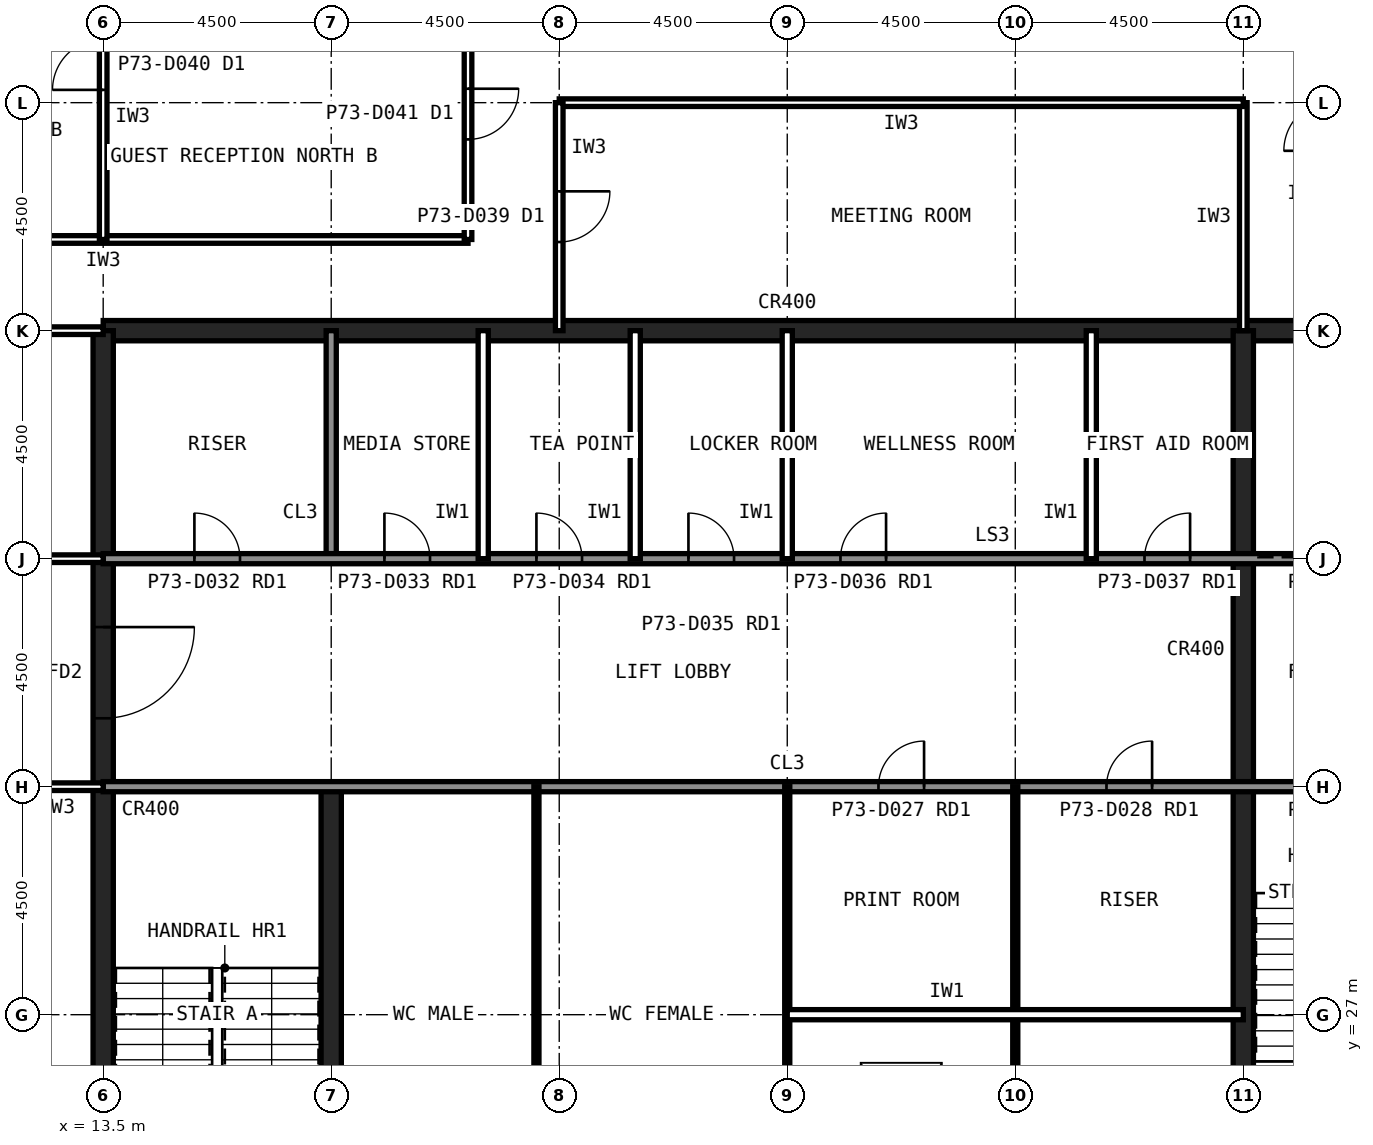
"""IFC4 building model, lengths in metres.
Left out: names, types, materials, properties, quantities, classifications, styles, units other than length and angle.
Written with IfcOpenShell. Run it as: python <this file> out.ifc"""

import sys

from ifc_helpers import new_model, si_unit, direction, frame, frame_2d, origin, place, context, subcontext, project, spatial, rectangle, extrude, element, fill, save


model = new_model("IFC4")
c1 = context("Model", 3, precision=1e-05, world=origin(), true_north=direction((0.0, 1.0)))
c2 = subcontext(c1, "Body", "Model", "MODEL_VIEW")
j1 = project(units=[si_unit("LENGTHUNIT", "METRE"), si_unit("PLANEANGLEUNIT", "RADIAN")], contexts=[c1])
p1 = place(None, origin())
s1 = spatial("IfcSite", under=j1, at=p1, CompositionType="ELEMENT")
p2 = place(p1, origin())
s2 = spatial("IfcBuilding", under=s1, at=p2, CompositionType="ELEMENT")
p3 = place(p2, frame((0.0, 0.0, 302.6)))
s3 = spatial("IfcBuildingStorey", under=s2, at=p3, CompositionType="ELEMENT", Elevation=302.6)
p4 = place(p3, frame((40.5, 40.5, 0.0), z_axis=(0.0, 0.0, 1.0), x_axis=(-1.0, 0.0, 0.0)))
e1 = element("IfcWall", 1, at=p4, inside=s3, PredefinedType="SHEAR", context=c2, shape_type="SweptSolid", body=[
    extrude(rectangle(XDim=27.0, YDim=0.4, at=frame_2d((13.5, 0.0))), origin(), (0.0, 0.0, 1.0), 4.0),
])
p5 = place(p3, frame((13.5, 40.5, 0.0), z_axis=(0.0, 0.0, 1.0), x_axis=(0.0, -1.0, 0.0)))
e2 = element("IfcWall", 2, at=p5, inside=s3, PredefinedType="SHEAR", context=c2, shape_type="SweptSolid", body=[
    extrude(rectangle(XDim=27.0, YDim=0.4, at=frame_2d((13.5, 0.0))), origin(), (0.0, 0.0, 1.0), 4.0),
])
p6 = place(p5, frame((19.65, 0.0, 0.0)))
e3 = element("IfcOpeningElement", 3, at=p6, cuts=e2, PredefinedType="OPENING", context=c2, shape_type="SweptSolid", body=[
    extrude(rectangle(XDim=1.2, YDim=2.1, at=frame_2d((0.6, 1.05))), frame((0.0, 0.21, 0.0), z_axis=(0.0, -1.0, 0.0), x_axis=(1.0, 0.0, 0.0)), (0.0, 0.0, 1.0), 0.42),
])
p7 = place(p5, frame((5.85, 0.0, 0.0)))
e4 = element("IfcOpeningElement", 4, at=p7, cuts=e2, PredefinedType="OPENING", context=c2, shape_type="SweptSolid", body=[
    extrude(rectangle(XDim=1.8, YDim=2.1, at=frame_2d((0.9, 1.05))), frame((0.0, 0.21, 0.0), z_axis=(0.0, -1.0, 0.0), x_axis=(1.0, 0.0, 0.0)), (0.0, 0.0, 1.0), 0.42),
])
p8 = place(p3, frame((18.0, 13.5, 0.0), z_axis=(0.0, 0.0, 1.0), x_axis=(0.0, 1.0, 0.0)))
e5 = element("IfcWall", 5, at=p8, inside=s3, PredefinedType="SHEAR", context=c2, shape_type="SweptSolid", body=[
    extrude(rectangle(XDim=18.0, YDim=0.4, at=frame_2d((9.0, 0.0))), origin(), (0.0, 0.0, 1.0), 4.0),
])
p9 = place(p3, frame((18.0, 36.0, 0.0), z_axis=(0.0, 0.0, 1.0), x_axis=(0.0, 1.0, 0.0)))
e6 = element("IfcWall", 6, at=p9, inside=s3, PredefinedType="SOLIDWALL", context=c2, shape_type="SweptSolid", body=[
    extrude(rectangle(XDim=4.5, YDim=0.2, at=frame_2d((2.25, 0.0))), origin(), (0.0, 0.0, 1.0), 3.84),
])
p10 = place(p3, frame((36.0, 22.5, 0.0), z_axis=(0.0, 0.0, 1.0), x_axis=(0.0, 1.0, 0.0)))
e7 = element("IfcWall", 7, at=p10, inside=s3, PredefinedType="SHEAR", context=c2, shape_type="SweptSolid", body=[
    extrude(rectangle(XDim=18.0, YDim=0.4, at=frame_2d((9.0, 0.0))), origin(), (0.0, 0.0, 1.0), 4.0),
])
p11 = place(p3, frame((13.5, 36.0, 0.0), z_axis=(0.0, 0.0, 1.0), x_axis=(1.0, 0.0, 0.0)))
e8 = element("IfcWall", 8, at=p11, inside=s3, PredefinedType="SOLIDWALL", context=c2, shape_type="SweptSolid", body=[
    extrude(rectangle(XDim=27.0, YDim=0.2, at=frame_2d((13.5, 0.0))), origin(), (0.0, 0.0, 1.0), 3.84),
])
p12 = place(p11, frame((1.8, 0.0, 0.0)))
e9 = element("IfcOpeningElement", 9, at=p12, cuts=e8, PredefinedType="OPENING", context=c2, shape_type="SweptSolid", body=[
    extrude(rectangle(XDim=0.9, YDim=2.1, at=frame_2d((0.45, 1.05))), frame((0.0, 0.11, 0.0), z_axis=(0.0, -1.0, 0.0), x_axis=(1.0, 0.0, 0.0)), (0.0, 0.0, 1.0), 0.22),
])
p13 = place(p11, frame((5.55, 0.0, 0.0)))
e10 = element("IfcOpeningElement", 10, at=p13, cuts=e8, PredefinedType="OPENING", context=c2, shape_type="SweptSolid", body=[
    extrude(rectangle(XDim=0.9, YDim=2.1, at=frame_2d((0.45, 1.05))), frame((0.0, 0.11, 0.0), z_axis=(0.0, -1.0, 0.0), x_axis=(1.0, 0.0, 0.0)), (0.0, 0.0, 1.0), 0.22),
])
p14 = place(p11, frame((14.55, 0.0, 0.0)))
e11 = element("IfcOpeningElement", 11, at=p14, cuts=e8, PredefinedType="OPENING", context=c2, shape_type="SweptSolid", body=[
    extrude(rectangle(XDim=0.9, YDim=2.1, at=frame_2d((0.45, 1.05))), frame((0.0, 0.11, 0.0), z_axis=(0.0, -1.0, 0.0), x_axis=(1.0, 0.0, 0.0)), (0.0, 0.0, 1.0), 0.22),
])
p15 = place(p11, frame((17.55, 0.0, 0.0)))
e12 = element("IfcOpeningElement", 12, at=p15, cuts=e8, PredefinedType="OPENING", context=c2, shape_type="SweptSolid", body=[
    extrude(rectangle(XDim=0.9, YDim=2.1, at=frame_2d((0.45, 1.05))), frame((0.0, 0.11, 0.0), z_axis=(0.0, -1.0, 0.0), x_axis=(1.0, 0.0, 0.0)), (0.0, 0.0, 1.0), 0.22),
])
p16 = place(p11, frame((20.55, 0.0, 0.0)))
e13 = element("IfcOpeningElement", 13, at=p16, cuts=e8, PredefinedType="OPENING", context=c2, shape_type="SweptSolid", body=[
    extrude(rectangle(XDim=0.9, YDim=2.1, at=frame_2d((0.45, 1.05))), frame((0.0, 0.11, 0.0), z_axis=(0.0, -1.0, 0.0), x_axis=(1.0, 0.0, 0.0)), (0.0, 0.0, 1.0), 0.22),
])
p17 = place(p11, frame((24.1, 0.0, 0.0)))
e14 = element("IfcOpeningElement", 14, at=p17, cuts=e8, PredefinedType="OPENING", context=c2, shape_type="SweptSolid", body=[
    extrude(rectangle(XDim=1.3, YDim=2.2, at=frame_2d((0.65, 1.1))), frame((0.0, 0.11, 0.0), z_axis=(0.0, -1.0, 0.0), x_axis=(1.0, 0.0, 0.0)), (0.0, 0.0, 1.0), 0.22),
])
p18 = place(p3, frame((13.5, 31.5, 0.0), z_axis=(0.0, 0.0, 1.0), x_axis=(1.0, 0.0, 0.0)))
e15 = element("IfcWall", 15, at=p18, inside=s3, PredefinedType="SOLIDWALL", context=c2, shape_type="SweptSolid", body=[
    extrude(rectangle(XDim=27.0, YDim=0.2, at=frame_2d((13.5, 0.0))), origin(), (0.0, 0.0, 1.0), 3.84),
])
p19 = place(p18, frame((24.15, 0.0, 0.0)))
e16 = element("IfcOpeningElement", 16, at=p19, cuts=e15, PredefinedType="OPENING", context=c2, shape_type="SweptSolid", body=[
    extrude(rectangle(XDim=1.2, YDim=2.1, at=frame_2d((0.6, 1.05))), frame((0.0, 0.11, 0.0), z_axis=(0.0, -1.0, 0.0), x_axis=(1.0, 0.0, 0.0)), (0.0, 0.0, 1.0), 0.22),
])
p20 = place(p18, frame((15.3, 0.0, 0.0)))
e17 = element("IfcOpeningElement", 17, at=p20, cuts=e15, PredefinedType="OPENING", context=c2, shape_type="SweptSolid", body=[
    extrude(rectangle(XDim=0.9, YDim=2.1, at=frame_2d((0.45, 1.05))), frame((0.0, 0.11, 0.0), z_axis=(0.0, -1.0, 0.0), x_axis=(1.0, 0.0, 0.0)), (0.0, 0.0, 1.0), 0.22),
])
p21 = place(p18, frame((19.8, 0.0, 0.0)))
e18 = element("IfcOpeningElement", 18, at=p21, cuts=e15, PredefinedType="OPENING", context=c2, shape_type="SweptSolid", body=[
    extrude(rectangle(XDim=0.9, YDim=2.1, at=frame_2d((0.45, 1.05))), frame((0.0, 0.11, 0.0), z_axis=(0.0, -1.0, 0.0), x_axis=(1.0, 0.0, 0.0)), (0.0, 0.0, 1.0), 0.22),
])
for number, where, z_axis, x_axis in (
    (19, (27.0, 36.0, 0.0), (0.0, 0.0, 1.0), (0.0, 1.0, 0.0)),
    (20, (30.0, 36.0, 0.0), (0.0, 0.0, 1.0), (0.0, 1.0, 0.0)),
    (21, (33.0, 36.0, 0.0), (0.0, 0.0, 1.0), (0.0, 1.0, 0.0)),
):
    element("IfcWall", number, at=place(p3, frame(where, z_axis=z_axis, x_axis=x_axis)), inside=s3, PredefinedType="PARTITIONING", context=c2, shape_type="SweptSolid", body=[
        extrude(rectangle(XDim=4.5, YDim=0.2, at=frame_2d((2.25, 0.0))), origin(), (0.0, 0.0, 1.0), 3.84),
    ])
for number, where, z_axis, x_axis in (
    (22, (22.05, 22.5, 0.0), (0.0, 0.0, 1.0), (0.0, 1.0, 0.0)),
    (23, (27.0, 22.5, 0.0), (0.0, 0.0, 1.0), (0.0, 1.0, 0.0)),
    (24, (31.5, 22.5, 0.0), (0.0, 0.0, 1.0), (0.0, 1.0, 0.0)),
):
    element("IfcWall", number, at=place(p3, frame(where, z_axis=z_axis, x_axis=x_axis)), inside=s3, PredefinedType="PLUMBINGWALL", context=c2, shape_type="SweptSolid", body=[
        extrude(rectangle(XDim=9.0, YDim=0.1, at=frame_2d((4.5, 0.0))), origin(), (0.0, 0.0, 1.0), 3.84),
    ])
p22 = place(p3, frame((27.0, 27.0, 0.0), z_axis=(0.0, 0.0, 1.0), x_axis=(1.0, 0.0, 0.0)))
e25 = element("IfcWall", 25, at=p22, inside=s3, PredefinedType="PARTITIONING", context=c2, shape_type="SweptSolid", body=[
    extrude(rectangle(XDim=9.0, YDim=0.2, at=frame_2d((4.5, 0.0))), origin(), (0.0, 0.0, 1.0), 3.84),
])
p23 = place(p3, frame((20.7, 42.3, 0.0), z_axis=(0.0, 0.0, 1.0), x_axis=(-1.0, 0.0, 0.0)))
e26 = element("IfcWall", 26, at=p23, inside=s3, PredefinedType="PARTITIONING", context=c2, shape_type="SweptSolid", body=[
    extrude(rectangle(XDim=14.4, YDim=0.15, at=frame_2d((7.2, 0.0))), origin(), (0.0, 0.0, 1.0), 3.84),
])
p24 = place(p3, frame((20.7, 47.25, 0.0), z_axis=(0.0, 0.0, 1.0), x_axis=(0.0, -1.0, 0.0)))
e27 = element("IfcWall", 27, at=p24, inside=s3, PredefinedType="PARTITIONING", context=c2, shape_type="SweptSolid", body=[
    extrude(rectangle(XDim=4.95, YDim=0.15, at=frame_2d((2.475, 0.0))), origin(), (0.0, 0.0, 1.0), 3.84),
])
p25 = place(p24, frame((1.975, 0.0, 0.0)))
e28 = element("IfcOpeningElement", 28, at=p25, cuts=e27, PredefinedType="OPENING", context=c2, shape_type="SweptSolid", body=[
    extrude(rectangle(XDim=1.0, YDim=2.1, at=frame_2d((0.5, 1.05))), frame((0.0, 0.085, 0.0), z_axis=(0.0, -1.0, 0.0), x_axis=(1.0, 0.0, 0.0)), (0.0, 0.0, 1.0), 0.17),
])
p26 = place(p3, frame((36.0, 40.5, 0.0), z_axis=(0.0, 0.0, 1.0), x_axis=(0.0, 1.0, 0.0)))
e29 = element("IfcWall", 29, at=p26, inside=s3, PredefinedType="PARTITIONING", context=c2, shape_type="SweptSolid", body=[
    extrude(rectangle(XDim=4.5, YDim=0.15, at=frame_2d((2.25, 0.0))), origin(), (0.0, 0.0, 1.0), 2.989),
])
p27 = place(p3, frame((36.0, 45.0, 0.0), z_axis=(0.0, 0.0, 1.0), x_axis=(-1.0, 0.0, 0.0)))
e30 = element("IfcWall", 30, at=p27, inside=s3, PredefinedType="PARTITIONING", context=c2, shape_type="SweptSolid", body=[
    extrude(rectangle(XDim=13.5, YDim=0.15, at=frame_2d((6.75, 0.0))), origin(), (0.0, 0.0, 1.0), 3.84),
])
p28 = place(p3, frame((22.5, 45.0, 0.0), z_axis=(0.0, 0.0, 1.0), x_axis=(0.0, -1.0, 0.0)))
e31 = element("IfcWall", 31, at=p28, inside=s3, PredefinedType="PARTITIONING", context=c2, shape_type="SweptSolid", body=[
    extrude(rectangle(XDim=4.5, YDim=0.15, at=frame_2d((2.25, 0.0))), origin(), (0.0, 0.0, 1.0), 2.989),
])
p29 = place(p28, frame((1.75, 0.0, 0.0)))
e32 = element("IfcOpeningElement", 32, at=p29, cuts=e31, PredefinedType="OPENING", context=c2, shape_type="SweptSolid", body=[
    extrude(rectangle(XDim=1.0, YDim=2.1, at=frame_2d((0.5, 1.05))), frame((0.0, 0.085, 0.0), z_axis=(0.0, -1.0, 0.0), x_axis=(1.0, 0.0, 0.0)), (0.0, 0.0, 1.0), 0.17),
])
p30 = place(p3, frame((13.5, 31.5, 0.0), z_axis=(0.0, 0.0, 1.0), x_axis=(-1.0, 0.0, 0.0)))
e33 = element("IfcWall", 33, at=p30, inside=s3, PredefinedType="PARTITIONING", context=c2, shape_type="SweptSolid", body=[
    extrude(rectangle(XDim=4.5, YDim=0.15, at=frame_2d((2.25, 0.0))), origin(), (0.0, 0.0, 1.0), 2.989),
])
p31 = place(p30, frame((1.75, 0.0, 0.0)))
e34 = element("IfcOpeningElement", 34, at=p31, cuts=e33, PredefinedType="OPENING", context=c2, shape_type="SweptSolid", body=[
    extrude(rectangle(XDim=1.0, YDim=2.1, at=frame_2d((0.5, 1.05))), frame((0.0, 0.085, 0.0), z_axis=(0.0, -1.0, 0.0), x_axis=(1.0, 0.0, 0.0)), (0.0, 0.0, 1.0), 0.17),
])
p32 = place(p3, frame((8.1, 36.0, 0.0), z_axis=(0.0, 0.0, 1.0), x_axis=(1.0, 0.0, 0.0)))
e35 = element("IfcWall", 35, at=p32, inside=s3, PredefinedType="PARTITIONING", context=c2, shape_type="SweptSolid", body=[
    extrude(rectangle(XDim=5.4, YDim=0.15, at=frame_2d((2.7, 0.0))), origin(), (0.0, 0.0, 1.0), 2.989),
])
p33 = place(p32, frame((2.2, 0.0, 0.0)))
e36 = element("IfcOpeningElement", 36, at=p33, cuts=e35, PredefinedType="OPENING", context=c2, shape_type="SweptSolid", body=[
    extrude(rectangle(XDim=1.0, YDim=2.1, at=frame_2d((0.5, 1.05))), frame((0.0, 0.085, 0.0), z_axis=(0.0, -1.0, 0.0), x_axis=(1.0, 0.0, 0.0)), (0.0, 0.0, 1.0), 0.17),
])
p34 = place(p3, frame((13.5, 40.5, 0.0), z_axis=(0.0, 0.0, 1.0), x_axis=(-1.0, 0.0, 0.0)))
e37 = element("IfcWall", 37, at=p34, inside=s3, PredefinedType="PARTITIONING", context=c2, shape_type="SweptSolid", body=[
    extrude(rectangle(XDim=5.4, YDim=0.15, at=frame_2d((2.7, 0.0))), origin(), (0.0, 0.0, 1.0), 2.989),
])
p35 = place(p3, frame((13.5, 42.3, 0.0), z_axis=(0.0, 0.0, 1.0), x_axis=(0.0, 1.0, 0.0)))
e38 = element("IfcWall", 38, at=p35, inside=s3, PredefinedType="PARTITIONING", context=c2, shape_type="SweptSolid", body=[
    extrude(rectangle(XDim=6.905, YDim=0.15, at=frame_2d((3.453, 0.0))), origin(), (0.0, 0.0, 1.0), 2.989),
])
p36 = place(p35, frame((2.952, 0.0, 0.0)))
e39 = element("IfcOpeningElement", 39, at=p36, cuts=e38, PredefinedType="OPENING", context=c2, shape_type="SweptSolid", body=[
    extrude(rectangle(XDim=1.0, YDim=2.1, at=frame_2d((0.5, 1.05))), frame((0.0, 0.085, 0.0), z_axis=(0.0, -1.0, 0.0), x_axis=(1.0, 0.0, 0.0)), (0.0, 0.0, 1.0), 0.17),
])
p37 = place(p7, origin())
e40 = element("IfcDoor", 40, at=p37, inside=s3, OperationType="SINGLE_SWING_LEFT", PredefinedType="DOOR", context=c2, shape_type="SweptSolid", body=[
    extrude(rectangle(XDim=1.8, YDim=2.1, at=frame_2d((0.9, 1.05))), frame((0.0, 0.025, 0.0), z_axis=(0.0, -1.0, 0.0), x_axis=(1.0, 0.0, 0.0)), (0.0, 0.0, 1.0), 0.05),
])
fill(e4, e40)
p38 = place(p20, origin())
e41 = element("IfcDoor", 41, at=p38, inside=s3, OperationType="SINGLE_SWING_RIGHT", PredefinedType="DOOR", context=c2, shape_type="SweptSolid", body=[
    extrude(rectangle(XDim=0.9, YDim=2.1, at=frame_2d((0.45, 1.05))), frame((0.0, 0.025, 0.0), z_axis=(0.0, -1.0, 0.0), x_axis=(1.0, 0.0, 0.0)), (0.0, 0.0, 1.0), 0.05),
])
fill(e17, e41)
p39 = place(p21, origin())
e42 = element("IfcDoor", 42, at=p39, inside=s3, OperationType="SINGLE_SWING_RIGHT", PredefinedType="DOOR", context=c2, shape_type="SweptSolid", body=[
    extrude(rectangle(XDim=0.9, YDim=2.1, at=frame_2d((0.45, 1.05))), frame((0.0, 0.025, 0.0), z_axis=(0.0, -1.0, 0.0), x_axis=(1.0, 0.0, 0.0)), (0.0, 0.0, 1.0), 0.05),
])
fill(e18, e42)
p40 = place(p12, origin())
e43 = element("IfcDoor", 43, at=p40, inside=s3, OperationType="SINGLE_SWING_LEFT", PredefinedType="DOOR", context=c2, shape_type="SweptSolid", body=[
    extrude(rectangle(XDim=0.9, YDim=2.1, at=frame_2d((0.45, 1.05))), frame((0.0, 0.025, 0.0), z_axis=(0.0, -1.0, 0.0), x_axis=(1.0, 0.0, 0.0)), (0.0, 0.0, 1.0), 0.05),
])
fill(e9, e43)
p41 = place(p13, origin())
e44 = element("IfcDoor", 44, at=p41, inside=s3, OperationType="SINGLE_SWING_LEFT", PredefinedType="DOOR", context=c2, shape_type="SweptSolid", body=[
    extrude(rectangle(XDim=0.9, YDim=2.1, at=frame_2d((0.45, 1.05))), frame((0.0, 0.025, 0.0), z_axis=(0.0, -1.0, 0.0), x_axis=(1.0, 0.0, 0.0)), (0.0, 0.0, 1.0), 0.05),
])
fill(e10, e44)
p42 = place(p14, origin())
e45 = element("IfcDoor", 45, at=p42, inside=s3, OperationType="SINGLE_SWING_RIGHT", PredefinedType="DOOR", context=c2, shape_type="SweptSolid", body=[
    extrude(rectangle(XDim=0.9, YDim=2.1, at=frame_2d((0.45, 1.05))), frame((0.0, 0.025, 0.0), z_axis=(0.0, -1.0, 0.0), x_axis=(1.0, 0.0, 0.0)), (0.0, 0.0, 1.0), 0.05),
])
fill(e11, e45)
p43 = place(p15, origin())
e46 = element("IfcDoor", 46, at=p43, inside=s3, OperationType="SINGLE_SWING_RIGHT", PredefinedType="DOOR", context=c2, shape_type="SweptSolid", body=[
    extrude(rectangle(XDim=0.9, YDim=2.1, at=frame_2d((0.45, 1.05))), frame((0.0, 0.025, 0.0), z_axis=(0.0, -1.0, 0.0), x_axis=(1.0, 0.0, 0.0)), (0.0, 0.0, 1.0), 0.05),
])
fill(e12, e46)
p44 = place(p16, origin())
e47 = element("IfcDoor", 47, at=p44, inside=s3, OperationType="SINGLE_SWING_RIGHT", PredefinedType="DOOR", context=c2, shape_type="SweptSolid", body=[
    extrude(rectangle(XDim=0.9, YDim=2.1, at=frame_2d((0.45, 1.05))), frame((0.0, 0.025, 0.0), z_axis=(0.0, -1.0, 0.0), x_axis=(1.0, 0.0, 0.0)), (0.0, 0.0, 1.0), 0.05),
])
fill(e13, e47)
p45 = place(p25, origin())
e48 = element("IfcDoor", 48, at=p45, inside=s3, OperationType="SINGLE_SWING_LEFT", PredefinedType="DOOR", context=c2, shape_type="SweptSolid", body=[
    extrude(rectangle(XDim=1.0, YDim=2.1, at=frame_2d((0.5, 1.05))), frame((0.0, 0.025, 0.0), z_axis=(0.0, -1.0, 0.0), x_axis=(1.0, 0.0, 0.0)), (0.0, 0.0, 1.0), 0.05),
])
fill(e28, e48)
p46 = place(p29, origin())
e49 = element("IfcDoor", 49, at=p46, inside=s3, OperationType="SINGLE_SWING_LEFT", PredefinedType="DOOR", context=c2, shape_type="SweptSolid", body=[
    extrude(rectangle(XDim=1.0, YDim=2.1, at=frame_2d((0.5, 1.05))), frame((0.0, 0.025, 0.0), z_axis=(0.0, -1.0, 0.0), x_axis=(1.0, 0.0, 0.0)), (0.0, 0.0, 1.0), 0.05),
])
fill(e32, e49)
p47 = place(p36, origin())
e50 = element("IfcDoor", 50, at=p47, inside=s3, OperationType="SINGLE_SWING_LEFT", PredefinedType="DOOR", context=c2, shape_type="SweptSolid", body=[
    extrude(rectangle(XDim=1.0, YDim=2.1, at=frame_2d((0.5, 1.05))), frame((0.0, 0.025, 0.0), z_axis=(0.0, -1.0, 0.0), x_axis=(1.0, 0.0, 0.0)), (0.0, 0.0, 1.0), 0.05),
])
fill(e39, e50)
save(model, sys.argv[1])
